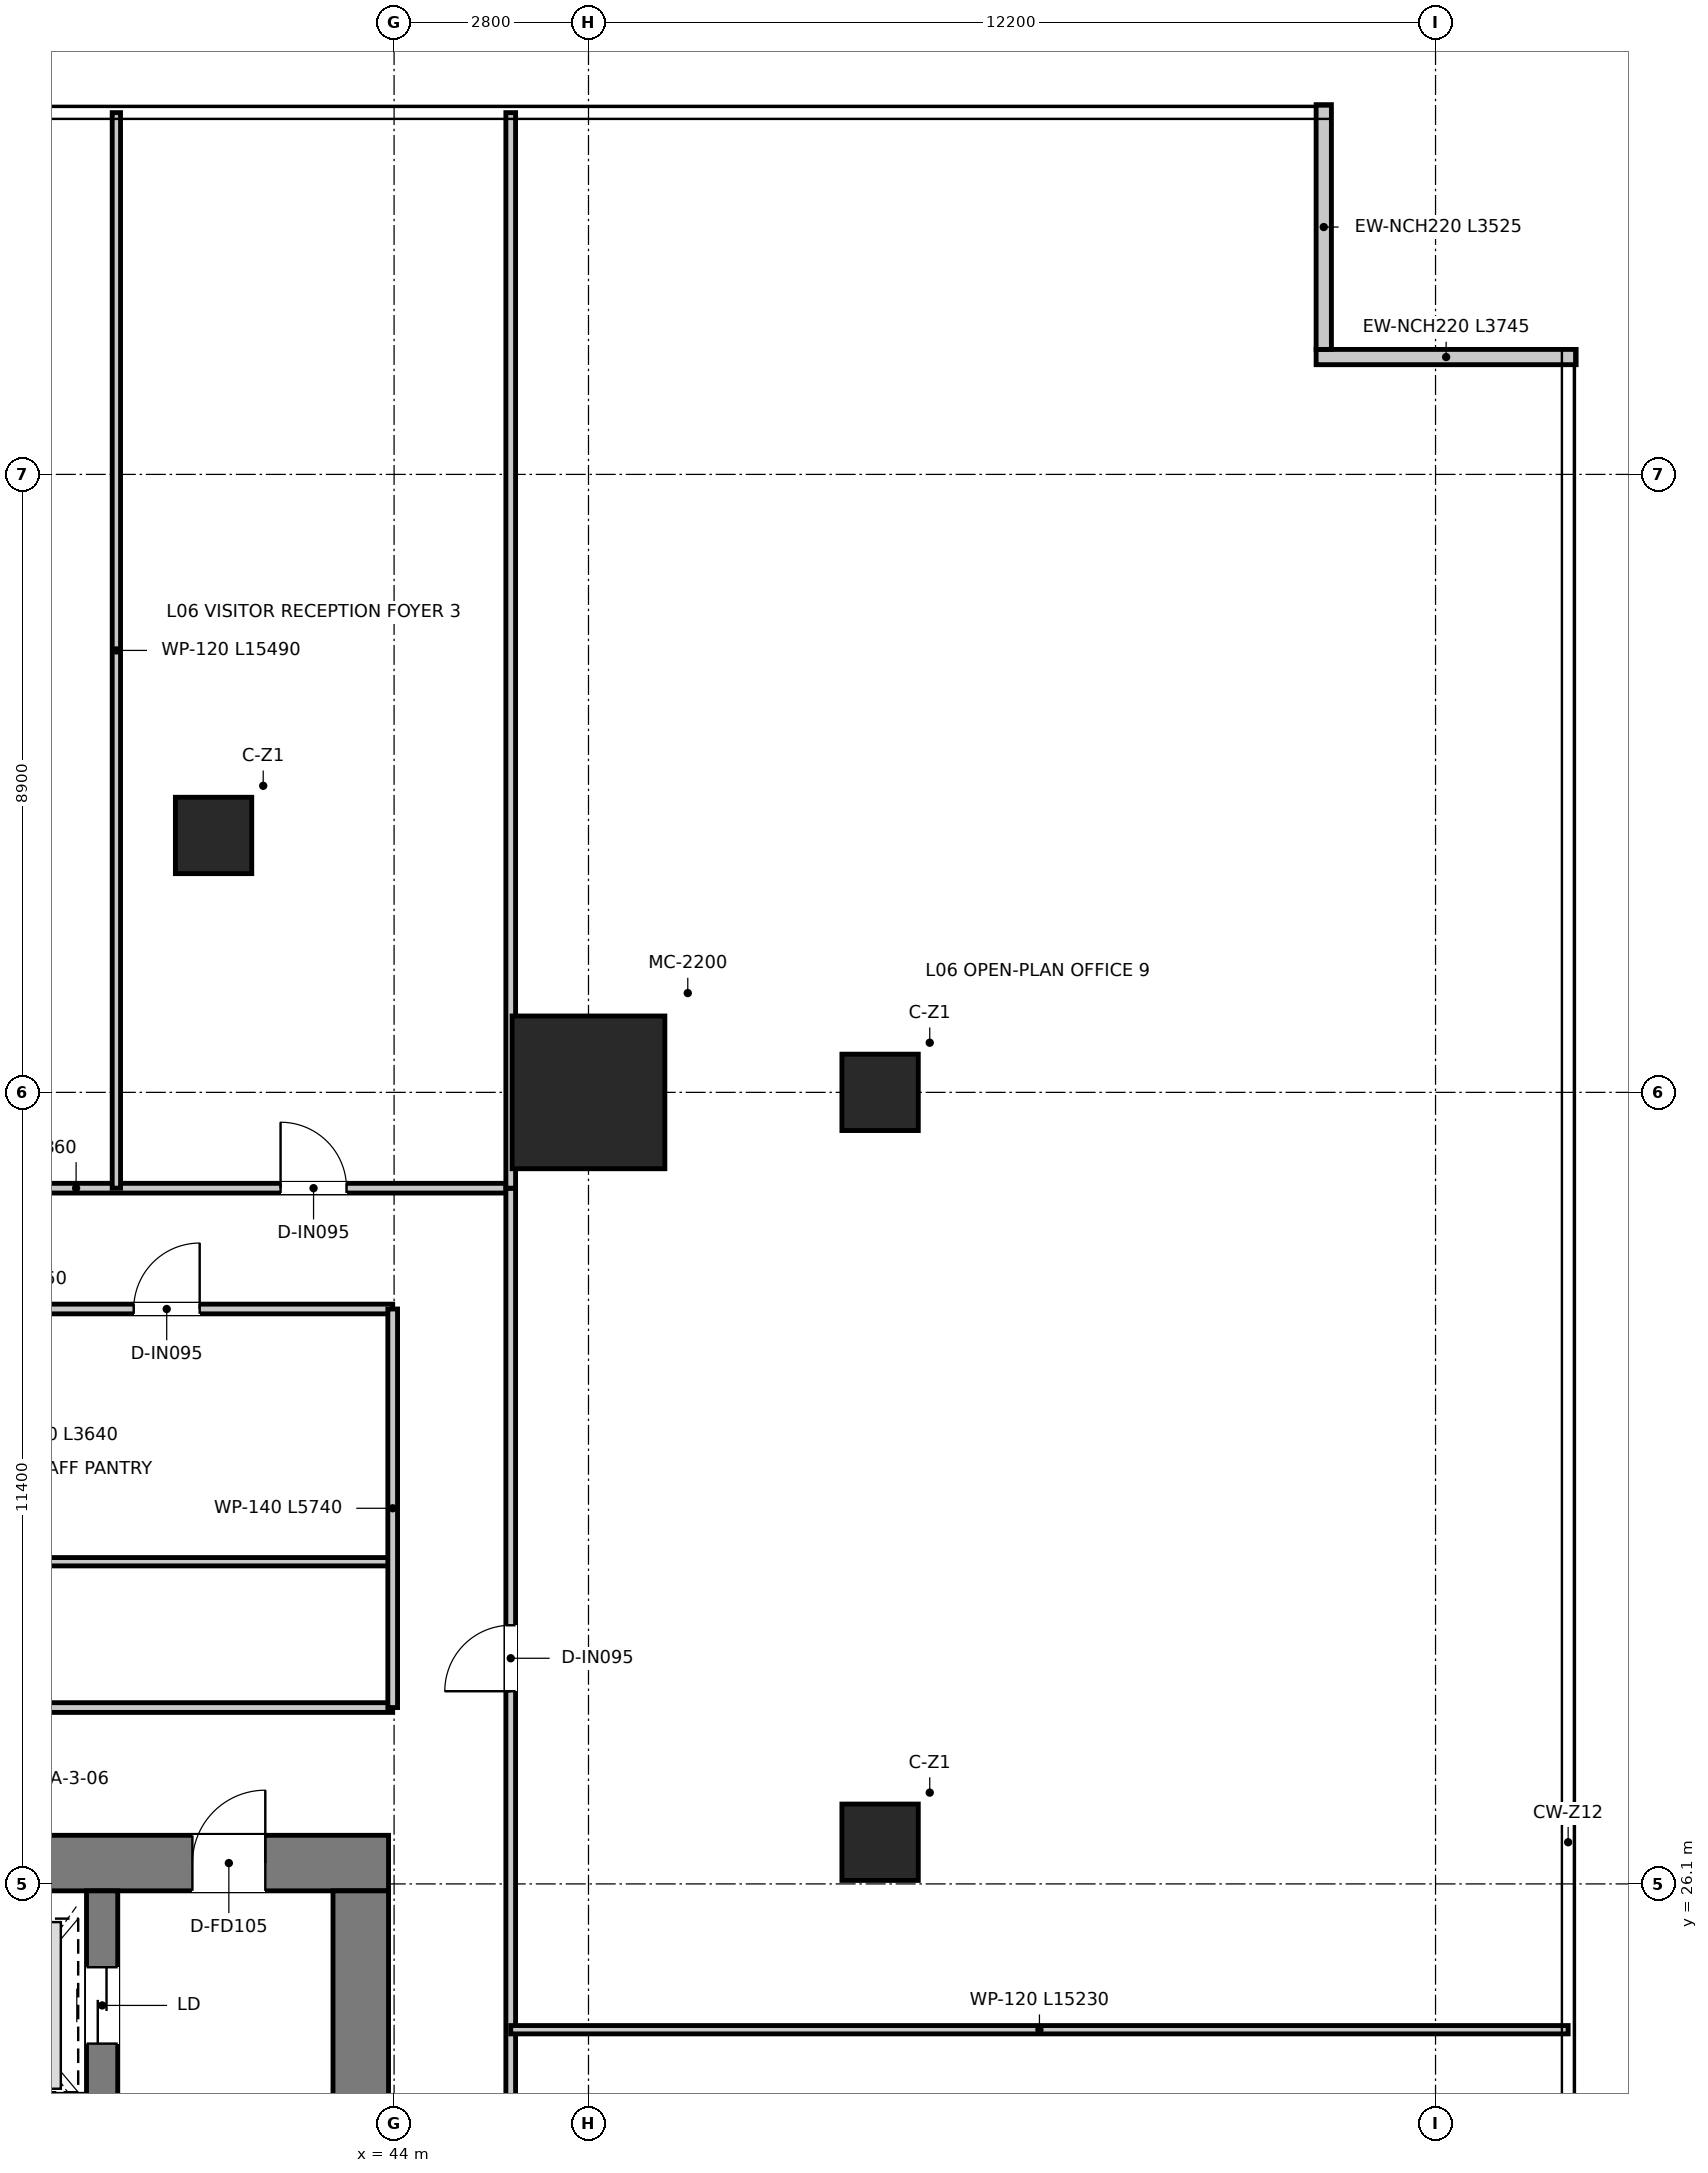
"""IFC4 building model, lengths in metres.
Left out: names, types, materials, properties, quantities, classifications, styles, units other than length and angle.
Written with IfcOpenShell. Run it as: python <this file> out.ifc"""

import sys

from ifc_helpers import new_model, si_unit, direction, frame, frame_2d, origin, origin_2d, place, context, subcontext, project, spatial, rectangle, extrude, source, transform, mapped, element, fill, save


model = new_model("IFC4")
c1 = context("Model", 3, precision=1e-05, world=origin(), true_north=direction((0.0, 1.0)))
c2 = subcontext(c1, "Body", "Model", "MODEL_VIEW")
j1 = project(units=[si_unit("LENGTHUNIT", "METRE"), si_unit("PLANEANGLEUNIT", "RADIAN")], contexts=[c1])
p1 = place(None, origin())
s1 = spatial("IfcSite", under=j1, at=p1, CompositionType="ELEMENT")
p2 = place(p1, origin())
s2 = spatial("IfcBuilding", under=s1, at=p2, CompositionType="ELEMENT")
p3 = place(p2, frame((0.0, 0.0, 28.95)))
s3 = spatial("IfcBuildingStorey", under=s2, at=p3, CompositionType="ELEMENT", Elevation=28.95)
p4 = place(p3, frame((28.08, 26.4, 0.0), z_axis=(0.0, 0.0, 1.0), x_axis=(1.0, 0.0, 0.0)))
e1 = element("IfcWall", 1, at=p4, inside=s3, PredefinedType="SHEAR", context=c2, shape_type="SweptSolid", body=[
    extrude(rectangle(XDim=15.84, YDim=0.8, at=frame_2d((7.92, 0.0))), origin(), (0.0, 0.0, 1.0), 3.95),
])
p5 = place(p4, frame((7.22, 0.0, 0.0)))
e2 = element("IfcOpeningElement", 2, at=p5, cuts=e1, PredefinedType="OPENING", context=c2, shape_type="SweptSolid", body=[
    extrude(rectangle(XDim=1.4, YDim=2.2, at=frame_2d((0.7, 1.1))), frame((0.0, 0.41, 0.0), z_axis=(0.0, -1.0, 0.0), x_axis=(1.0, 0.0, 0.0)), (0.0, 0.0, 1.0), 0.82),
])
p6 = place(p4, frame((1.775, 0.0, 0.0)))
e3 = element("IfcOpeningElement", 3, at=p6, cuts=e1, PredefinedType="OPENING", context=c2, shape_type="SweptSolid", body=[
    extrude(rectangle(XDim=1.05, YDim=2.1, at=frame_2d((0.525, 1.05))), frame((0.0, 0.41, 0.0), z_axis=(0.0, -1.0, 0.0), x_axis=(1.0, 0.0, 0.0)), (0.0, 0.0, 1.0), 0.82),
])
p7 = place(p4, frame((13.015, 0.0, 0.0)))
e4 = element("IfcOpeningElement", 4, at=p7, cuts=e1, PredefinedType="OPENING", context=c2, shape_type="SweptSolid", body=[
    extrude(rectangle(XDim=1.05, YDim=2.1, at=frame_2d((0.525, 1.05))), frame((0.0, 0.41, 0.0), z_axis=(0.0, -1.0, 0.0), x_axis=(1.0, 0.0, 0.0)), (0.0, 0.0, 1.0), 0.82),
])
p8 = place(p3, frame((43.52, 11.3, 0.0), z_axis=(0.0, 0.0, 1.0), x_axis=(0.0, 1.0, 0.0)))
e5 = element("IfcWall", 5, at=p8, inside=s3, PredefinedType="SHEAR", context=c2, shape_type="SweptSolid", body=[
    extrude(rectangle(XDim=14.7, YDim=0.8, at=frame_2d((7.35, 0.0))), origin(), (0.0, 0.0, 1.0), 3.95),
])
p9 = place(p3, frame((39.795, 13.22, 0.0), z_axis=(0.0, 0.0, 1.0), x_axis=(0.0, 1.0, 0.0)))
e6 = element("IfcWall", 6, at=p9, inside=s3, PredefinedType="SHEAR", context=c2, shape_type="SweptSolid", body=[
    extrude(rectangle(XDim=12.78, YDim=0.45, at=frame_2d((6.39, 0.0))), origin(), (0.0, 0.0, 1.0), 3.95),
])
p10 = place(p9, frame((10.58, 0.0, 0.0)))
e7 = element("IfcOpeningElement", 7, at=p10, cuts=e6, PredefinedType="OPENING", context=c2, shape_type="SweptSolid", body=[
    extrude(rectangle(XDim=1.1, YDim=2.15, at=frame_2d((0.55, 1.075))), frame((0.0, 0.235, 0.0), z_axis=(0.0, -1.0, 0.0), x_axis=(1.0, 0.0, 0.0)), (0.0, 0.0, 1.0), 0.47),
])
m1 = source(origin(), c2, "Body", "SweptSolid", [
    extrude(rectangle(XDim=2.2, YDim=2.2, at=origin_2d()), origin(), (0.0, 0.0, 1.0), 3.95),
])
p11 = place(p3, frame((46.8, 37.5, 0.0), z_axis=(0.0, 0.0, 1.0), x_axis=(1.0, 0.0, 0.0)))
e8 = element("IfcColumn", 8, at=p11, inside=s3, PredefinedType="USERDEFINED", context=c2, shape_type="MappedRepresentation", body=[
    mapped(m1, transform((0.0, 0.0, 0.0), x_axis=(1.0, 0.0, 0.0), y_axis=(0.0, 1.0, 0.0), z_axis=(0.0, 0.0, 1.0), scale=1.0)),
])
m2 = source(origin(), c2, "Body", "SweptSolid", [
    extrude(rectangle(XDim=1.1, YDim=1.1, at=origin_2d()), origin(), (0.0, 0.0, 1.0), 3.95),
])
for number, where, z_axis, x_axis in (
    (9, (41.4, 41.2, 0.0), (0.0, 0.0, 1.0), (1.0, 0.0, 0.0)),
    (10, (51.0, 37.5, 0.0), (0.0, 0.0, 1.0), (1.0, 0.0, 0.0)),
    (11, (51.0, 26.7, 0.0), (0.0, 0.0, 1.0), (1.0, 0.0, 0.0)),
):
    element("IfcColumn", number, at=place(p3, frame(where, z_axis=z_axis, x_axis=x_axis)), inside=s3, PredefinedType="COLUMN", context=c2, shape_type="MappedRepresentation", body=[
        mapped(m2, transform((0.0, 0.0, 0.0), x_axis=(1.0, 0.0, 0.0), y_axis=(0.0, 1.0, 0.0), z_axis=(0.0, 0.0, 1.0), scale=1.0)),
    ])
p12 = place(p3, frame((61.025, 48.09, 0.0), z_axis=(0.0, 0.0, 1.0), x_axis=(-1.0, 0.0, 0.0)))
e12 = element("IfcWall", 12, at=p12, inside=s3, PredefinedType="ELEMENTEDWALL", context=c2, shape_type="SweptSolid", body=[
    extrude(rectangle(XDim=3.745, YDim=0.22, at=frame_2d((1.873, 0.0))), origin(), (0.0, 0.0, 1.0), 3.67),
])
p13 = place(p3, frame((57.39, 48.2, 0.0), z_axis=(0.0, 0.0, 1.0), x_axis=(0.0, 1.0, 0.0)))
e13 = element("IfcWall", 13, at=p13, inside=s3, PredefinedType="ELEMENTEDWALL", context=c2, shape_type="SweptSolid", body=[
    extrude(rectangle(XDim=3.525, YDim=0.22, at=frame_2d((1.763, 0.0))), origin(), (0.0, 0.0, 1.0), 3.67),
])
p14 = place(p3, frame((28.02, 28.64, 0.0), z_axis=(0.0, 0.0, 1.0), x_axis=(1.0, 0.0, 0.0)))
e14 = element("IfcWall", 14, at=p14, inside=s3, PredefinedType="PARTITIONING", context=c2, shape_type="SweptSolid", body=[
    extrude(rectangle(XDim=15.96, YDim=0.14, at=frame_2d((7.98, 0.0))), origin(), (0.0, 0.0, 1.0), 3.08),
])
p15 = place(p14, frame((7.455, 0.0, 0.0)))
e15 = element("IfcOpeningElement", 15, at=p15, cuts=e14, PredefinedType="OPENING", context=c2, shape_type="SweptSolid", body=[
    extrude(rectangle(XDim=1.05, YDim=2.15, at=frame_2d((0.525, 1.075))), frame((0.0, 0.08, 0.0), z_axis=(0.0, -1.0, 0.0), x_axis=(1.0, 0.0, 0.0)), (0.0, 0.0, 1.0), 0.16),
])
p16 = place(p3, frame((28.02, 30.74, 0.0), z_axis=(0.0, 0.0, 1.0), x_axis=(1.0, 0.0, 0.0)))
e16 = element("IfcWall", 16, at=p16, inside=s3, PredefinedType="PARTITIONING", context=c2, shape_type="SweptSolid", body=[
    extrude(rectangle(XDim=15.96, YDim=0.12, at=frame_2d((7.98, 0.0))), origin(), (0.0, 0.0, 1.0), 3.08),
])
p17 = place(p3, frame((28.02, 34.38, 0.0), z_axis=(0.0, 0.0, 1.0), x_axis=(1.0, 0.0, 0.0)))
e17 = element("IfcWall", 17, at=p17, inside=s3, PredefinedType="PARTITIONING", context=c2, shape_type="SweptSolid", body=[
    extrude(rectangle(XDim=15.96, YDim=0.14, at=frame_2d((7.98, 0.0))), origin(), (0.0, 0.0, 1.0), 3.08),
])
p18 = place(p17, frame((1.13, 0.0, 0.0)))
e18 = element("IfcOpeningElement", 18, at=p18, cuts=e17, PredefinedType="OPENING", context=c2, shape_type="SweptSolid", body=[
    extrude(rectangle(XDim=0.9, YDim=2.1, at=frame_2d((0.45, 1.05))), frame((0.0, 0.08, 0.0), z_axis=(0.0, -1.0, 0.0), x_axis=(1.0, 0.0, 0.0)), (0.0, 0.0, 1.0), 0.16),
])
p19 = place(p17, frame((4.33, 0.0, 0.0)))
e19 = element("IfcOpeningElement", 19, at=p19, cuts=e17, PredefinedType="OPENING", context=c2, shape_type="SweptSolid", body=[
    extrude(rectangle(XDim=0.9, YDim=2.1, at=frame_2d((0.45, 1.05))), frame((0.0, 0.08, 0.0), z_axis=(0.0, -1.0, 0.0), x_axis=(1.0, 0.0, 0.0)), (0.0, 0.0, 1.0), 0.16),
])
p20 = place(p17, frame((7.355, 0.0, 0.0)))
e20 = element("IfcOpeningElement", 20, at=p20, cuts=e17, PredefinedType="OPENING", context=c2, shape_type="SweptSolid", body=[
    extrude(rectangle(XDim=0.95, YDim=2.1, at=frame_2d((0.475, 1.05))), frame((0.0, 0.08, 0.0), z_axis=(0.0, -1.0, 0.0), x_axis=(1.0, 0.0, 0.0)), (0.0, 0.0, 1.0), 0.16),
])
p21 = place(p17, frame((12.23, 0.0, 0.0)))
e21 = element("IfcOpeningElement", 21, at=p21, cuts=e17, PredefinedType="OPENING", context=c2, shape_type="SweptSolid", body=[
    extrude(rectangle(XDim=0.95, YDim=2.1, at=frame_2d((0.475, 1.05))), frame((0.0, 0.08, 0.0), z_axis=(0.0, -1.0, 0.0), x_axis=(1.0, 0.0, 0.0)), (0.0, 0.0, 1.0), 0.16),
])
p22 = place(p3, frame((43.98, 28.64, 0.0), z_axis=(0.0, 0.0, 1.0), x_axis=(0.0, 1.0, 0.0)))
e22 = element("IfcWall", 22, at=p22, inside=s3, PredefinedType="PARTITIONING", context=c2, shape_type="SweptSolid", body=[
    extrude(rectangle(XDim=5.74, YDim=0.14, at=frame_2d((2.87, 0.0))), origin(), (0.0, 0.0, 1.0), 3.22),
])
p23 = place(p3, frame((26.32, 36.12, 0.0), z_axis=(0.0, 0.0, 1.0), x_axis=(1.0, 0.0, 0.0)))
e23 = element("IfcWall", 23, at=p23, inside=s3, PredefinedType="PARTITIONING", context=c2, shape_type="SweptSolid", body=[
    extrude(rectangle(XDim=19.36, YDim=0.14, at=frame_2d((9.68, 0.0))), origin(), (0.0, 0.0, 1.0), 3.08),
])
p24 = place(p23, frame((2.365, 0.0, 0.0)))
e24 = element("IfcOpeningElement", 24, at=p24, cuts=e23, PredefinedType="OPENING", context=c2, shape_type="SweptSolid", body=[
    extrude(rectangle(XDim=0.95, YDim=2.1, at=frame_2d((0.475, 1.05))), frame((0.0, 0.08, 0.0), z_axis=(0.0, -1.0, 0.0), x_axis=(1.0, 0.0, 0.0)), (0.0, 0.0, 1.0), 0.16),
])
p25 = place(p23, frame((9.205, 0.0, 0.0)))
e25 = element("IfcOpeningElement", 25, at=p25, cuts=e23, PredefinedType="OPENING", context=c2, shape_type="SweptSolid", body=[
    extrude(rectangle(XDim=0.95, YDim=2.1, at=frame_2d((0.475, 1.05))), frame((0.0, 0.08, 0.0), z_axis=(0.0, -1.0, 0.0), x_axis=(1.0, 0.0, 0.0)), (0.0, 0.0, 1.0), 0.16),
])
p26 = place(p23, frame((16.045, 0.0, 0.0)))
e26 = element("IfcOpeningElement", 26, at=p26, cuts=e23, PredefinedType="OPENING", context=c2, shape_type="SweptSolid", body=[
    extrude(rectangle(XDim=0.95, YDim=2.1, at=frame_2d((0.475, 1.05))), frame((0.0, 0.08, 0.0), z_axis=(0.0, -1.0, 0.0), x_axis=(1.0, 0.0, 0.0)), (0.0, 0.0, 1.0), 0.16),
])
p27 = place(p3, frame((45.68, 10.5, 0.0), z_axis=(0.0, 0.0, 1.0), x_axis=(0.0, 1.0, 0.0)))
e27 = element("IfcWall", 27, at=p27, inside=s3, PredefinedType="PARTITIONING", context=c2, shape_type="SweptSolid", body=[
    extrude(rectangle(XDim=25.62, YDim=0.14, at=frame_2d((12.81, 0.0))), origin(), (0.0, 0.0, 1.0), 2.97),
])
p28 = place(p27, frame((9.775, 0.0, 0.0)))
e28 = element("IfcOpeningElement", 28, at=p28, cuts=e27, PredefinedType="OPENING", context=c2, shape_type="SweptSolid", body=[
    extrude(rectangle(XDim=0.95, YDim=2.1, at=frame_2d((0.475, 1.05))), frame((0.0, 0.08, 0.0), z_axis=(0.0, -1.0, 0.0), x_axis=(1.0, 0.0, 0.0)), (0.0, 0.0, 1.0), 0.16),
])
p29 = place(p27, frame((18.375, 0.0, 0.0)))
e29 = element("IfcOpeningElement", 29, at=p29, cuts=e27, PredefinedType="OPENING", context=c2, shape_type="SweptSolid", body=[
    extrude(rectangle(XDim=0.95, YDim=2.1, at=frame_2d((0.475, 1.05))), frame((0.0, 0.08, 0.0), z_axis=(0.0, -1.0, 0.0), x_axis=(1.0, 0.0, 0.0)), (0.0, 0.0, 1.0), 0.16),
])
p30 = place(p3, frame((45.68, 36.12, 0.0), z_axis=(0.0, 0.0, 1.0), x_axis=(0.0, 1.0, 0.0)))
e30 = element("IfcWall", 30, at=p30, inside=s3, PredefinedType="PARTITIONING", context=c2, shape_type="SweptSolid", body=[
    extrude(rectangle(XDim=15.49, YDim=0.14, at=frame_2d((7.745, 0.0))), origin(), (0.0, 0.0, 1.0), 2.97),
])
p31 = place(p3, frame((40.0, 36.12, 0.0), z_axis=(0.0, 0.0, 1.0), x_axis=(0.0, 1.0, 0.0)))
e31 = element("IfcWall", 31, at=p31, inside=s3, PredefinedType="PARTITIONING", context=c2, shape_type="SweptSolid", body=[
    extrude(rectangle(XDim=15.49, YDim=0.12, at=frame_2d((7.745, 0.0))), origin(), (0.0, 0.0, 1.0), 2.97),
])
p32 = place(p3, frame((45.68, 24.0, 0.0), z_axis=(0.0, 0.0, 1.0), x_axis=(1.0, 0.0, 0.0)))
e32 = element("IfcWall", 32, at=p32, inside=s3, PredefinedType="PARTITIONING", context=c2, shape_type="SweptSolid", body=[
    extrude(rectangle(XDim=15.23, YDim=0.12, at=frame_2d((7.615, 0.0))), origin(), (0.0, 0.0, 1.0), 2.97),
])
p33 = place(p7, origin())
e33 = element("IfcDoor", 33, at=p33, inside=s3, OperationType="SINGLE_SWING_RIGHT", PredefinedType="DOOR", context=c2, shape_type="SweptSolid", body=[
    extrude(rectangle(XDim=1.05, YDim=2.1, at=frame_2d((0.525, 1.05))), frame((0.0, 0.025, 0.0), z_axis=(0.0, -1.0, 0.0), x_axis=(1.0, 0.0, 0.0)), (0.0, 0.0, 1.0), 0.05),
])
fill(e4, e33)
p34 = place(p10, origin())
e34 = element("IfcDoor", 34, at=p34, inside=s3, OperationType="DOUBLE_DOOR_SLIDING", PredefinedType="DOOR", context=c2, shape_type="SweptSolid", body=[
    extrude(rectangle(XDim=1.1, YDim=2.15, at=frame_2d((0.55, 1.075))), frame((0.0, 0.025, 0.0), z_axis=(0.0, -1.0, 0.0), x_axis=(1.0, 0.0, 0.0)), (0.0, 0.0, 1.0), 0.05),
])
fill(e7, e34)
p35 = place(p21, origin())
e35 = element("IfcDoor", 35, at=p35, inside=s3, OperationType="SINGLE_SWING_RIGHT", PredefinedType="DOOR", context=c2, shape_type="SweptSolid", body=[
    extrude(rectangle(XDim=0.95, YDim=2.1, at=frame_2d((0.475, 1.05))), frame((0.0, 0.025, 0.0), z_axis=(0.0, -1.0, 0.0), x_axis=(1.0, 0.0, 0.0)), (0.0, 0.0, 1.0), 0.05),
])
fill(e21, e35)
p36 = place(p26, origin())
e36 = element("IfcDoor", 36, at=p36, inside=s3, OperationType="SINGLE_SWING_LEFT", PredefinedType="DOOR", context=c2, shape_type="SweptSolid", body=[
    extrude(rectangle(XDim=0.95, YDim=2.1, at=frame_2d((0.475, 1.05))), frame((0.0, 0.025, 0.0), z_axis=(0.0, -1.0, 0.0), x_axis=(1.0, 0.0, 0.0)), (0.0, 0.0, 1.0), 0.05),
])
fill(e26, e36)
p37 = place(p29, origin())
e37 = element("IfcDoor", 37, at=p37, inside=s3, OperationType="SINGLE_SWING_LEFT", PredefinedType="DOOR", context=c2, shape_type="SweptSolid", body=[
    extrude(rectangle(XDim=0.95, YDim=2.1, at=frame_2d((0.475, 1.05))), frame((0.0, 0.025, 0.0), z_axis=(0.0, -1.0, 0.0), x_axis=(1.0, 0.0, 0.0)), (0.0, 0.0, 1.0), 0.05),
])
fill(e29, e37)
save(model, sys.argv[1])
